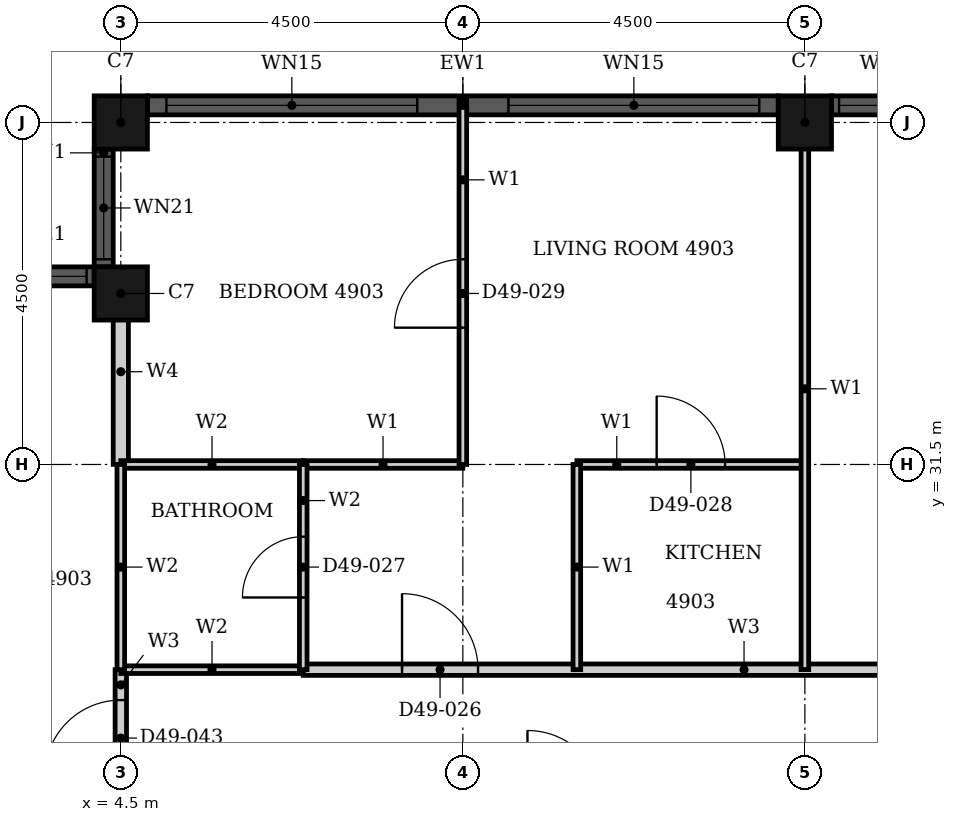
"""IFC4 building model, lengths in metres.
Left out: names, types, materials, properties, quantities, classifications, styles, units other than length and angle.
Written with IfcOpenShell. Run it as: python <this file> out.ifc"""

import sys

from ifc_helpers import new_model, si_unit, direction, frame, frame_2d, origin, origin_2d, place, context, subcontext, project, spatial, rectangle, hollow_rectangle, extrude, element, fill, save


model = new_model("IFC4")
c1 = context("Model", 3, precision=1e-05, world=origin(), true_north=direction((0.0, 1.0)))
c2 = subcontext(c1, "Body", "Model", "MODEL_VIEW")
j1 = project(units=[si_unit("LENGTHUNIT", "METRE"), si_unit("PLANEANGLEUNIT", "RADIAN")], contexts=[c1])
p1 = place(None, origin())
s1 = spatial("IfcSite", under=j1, at=p1, CompositionType="ELEMENT")
p2 = place(p1, origin())
s2 = spatial("IfcBuilding", under=s1, at=p2, CompositionType="ELEMENT")
p3 = place(p2, frame((0.0, 0.0, 196.1)))
s3 = spatial("IfcBuildingStorey", under=s2, at=p3, CompositionType="ELEMENT", Elevation=196.1)
for number, where, z_axis, x_axis in (
    (1, (13.5, 36.0, 0.0), (0.0, 0.0, 1.0), (1.0, 0.0, 0.0)),
    (2, (4.5, 36.0, 0.0), (0.0, 0.0, 1.0), (1.0, 0.0, 0.0)),
    (3, (4.5, 33.75, 0.0), (0.0, 0.0, 1.0), (1.0, 0.0, 0.0)),
):
    element("IfcColumn", number, at=place(p3, frame(where, z_axis=z_axis, x_axis=x_axis)), inside=s3, PredefinedType="COLUMN", context=c2, shape_type="SweptSolid", body=[
        extrude(hollow_rectangle(XDim=0.7, YDim=0.7, WallThickness=0.022, at=origin_2d()), origin(), (0.0, 0.0, 1.0), 3.7),
    ])
p4 = place(p3, frame((15.4, 36.225, 0.0), z_axis=(0.0, 0.0, 1.0), x_axis=(-1.0, 0.0, 0.0)))
e4 = element("IfcWall", 4, at=p4, inside=s3, PredefinedType="SOLIDWALL", context=c2, shape_type="SweptSolid", body=[
    extrude(rectangle(XDim=1.55, YDim=0.25, at=frame_2d((0.775, 0.0))), origin(), (0.0, 0.0, 1.0), 3.7),
])
p5 = place(p4, frame((0.1, 0.0, 0.9)))
e5 = element("IfcOpeningElement", 5, at=p5, cuts=e4, PredefinedType="OPENING", context=c2, shape_type="SweptSolid", body=[
    extrude(rectangle(XDim=1.35, YDim=1.85, at=frame_2d((0.675, 0.925))), frame((0.0, 0.135, 0.0), z_axis=(0.0, -1.0, 0.0), x_axis=(1.0, 0.0, 0.0)), (0.0, 0.0, 1.0), 0.27),
])
p6 = place(p3, frame((13.15, 36.225, 0.0), z_axis=(0.0, 0.0, 1.0), x_axis=(-1.0, 0.0, 0.0)))
e6 = element("IfcWall", 6, at=p6, inside=s3, PredefinedType="SOLIDWALL", context=c2, shape_type="SweptSolid", body=[
    extrude(rectangle(XDim=8.3, YDim=0.25, at=frame_2d((4.15, 0.0))), origin(), (0.0, 0.0, 1.0), 3.7),
])
p7 = place(p6, frame((0.25, 0.0, 0.45)))
e7 = element("IfcOpeningElement", 7, at=p7, cuts=e6, PredefinedType="OPENING", context=c2, shape_type="SweptSolid", body=[
    extrude(rectangle(XDim=3.3, YDim=2.3, at=frame_2d((1.65, 1.15))), frame((0.0, 0.135, 0.0), z_axis=(0.0, -1.0, 0.0), x_axis=(1.0, 0.0, 0.0)), (0.0, 0.0, 1.0), 0.27),
])
p8 = place(p6, frame((4.75, 0.0, 0.45)))
e8 = element("IfcOpeningElement", 8, at=p8, cuts=e6, PredefinedType="OPENING", context=c2, shape_type="SweptSolid", body=[
    extrude(rectangle(XDim=3.3, YDim=2.3, at=frame_2d((1.65, 1.15))), frame((0.0, 0.135, 0.0), z_axis=(0.0, -1.0, 0.0), x_axis=(1.0, 0.0, 0.0)), (0.0, 0.0, 1.0), 0.27),
])
p9 = place(p3, frame((4.275, 35.65, 0.0), z_axis=(0.0, 0.0, 1.0), x_axis=(0.0, -1.0, 0.0)))
e9 = element("IfcWall", 9, at=p9, inside=s3, PredefinedType="SOLIDWALL", context=c2, shape_type="SweptSolid", body=[
    extrude(rectangle(XDim=1.55, YDim=0.25, at=frame_2d((0.775, 0.0))), origin(), (0.0, 0.0, 1.0), 3.7),
])
p10 = place(p9, frame((0.1, 0.0, 0.9)))
e10 = element("IfcOpeningElement", 10, at=p10, cuts=e9, PredefinedType="OPENING", context=c2, shape_type="SweptSolid", body=[
    extrude(rectangle(XDim=1.35, YDim=1.85, at=frame_2d((0.675, 0.925))), frame((0.0, 0.135, 0.0), z_axis=(0.0, -1.0, 0.0), x_axis=(1.0, 0.0, 0.0)), (0.0, 0.0, 1.0), 0.27),
])
p11 = place(p3, frame((4.15, 33.975, 0.0), z_axis=(0.0, 0.0, 1.0), x_axis=(-1.0, 0.0, 0.0)))
e11 = element("IfcWall", 11, at=p11, inside=s3, PredefinedType="SOLIDWALL", context=c2, shape_type="SweptSolid", body=[
    extrude(rectangle(XDim=1.55, YDim=0.25, at=frame_2d((0.775, 0.0))), origin(), (0.0, 0.0, 1.0), 3.7),
])
p12 = place(p11, frame((0.1, 0.0, 0.9)))
e12 = element("IfcOpeningElement", 12, at=p12, cuts=e11, PredefinedType="OPENING", context=c2, shape_type="SweptSolid", body=[
    extrude(rectangle(XDim=1.35, YDim=1.85, at=frame_2d((0.675, 0.925))), frame((0.0, 0.135, 0.0), z_axis=(0.0, -1.0, 0.0), x_axis=(1.0, 0.0, 0.0)), (0.0, 0.0, 1.0), 0.27),
])
p13 = place(p3, frame((6.9, 28.8, 0.0), z_axis=(0.0, 0.0, 1.0), x_axis=(1.0, 0.0, 0.0)))
e13 = element("IfcWall", 13, at=p13, inside=s3, PredefinedType="PARTITIONING", context=c2, shape_type="SweptSolid", body=[
    extrude(rectangle(XDim=9.299, YDim=0.15, at=frame_2d((4.649, 0.0))), origin(), (0.0, 0.0, 1.0), 3.4),
])
p14 = place(p13, frame((1.3, 0.0, 0.0)))
e14 = element("IfcOpeningElement", 14, at=p14, cuts=e13, PredefinedType="OPENING", context=c2, shape_type="SweptSolid", body=[
    extrude(rectangle(XDim=1.0, YDim=2.2, at=frame_2d((0.5, 1.1))), frame((0.0, 0.085, 0.0), z_axis=(0.0, -1.0, 0.0), x_axis=(1.0, 0.0, 0.0)), (0.0, 0.0, 1.0), 0.17),
])
p15 = place(p3, frame((4.5, 27.0, 0.0), z_axis=(0.0, 0.0, 1.0), x_axis=(0.0, 1.0, 0.0)))
e15 = element("IfcWall", 15, at=p15, inside=s3, PredefinedType="PARTITIONING", context=c2, shape_type="SweptSolid", body=[
    extrude(rectangle(XDim=1.8, YDim=0.15, at=frame_2d((0.9, 0.0))), origin(), (0.0, 0.0, 1.0), 3.4),
])
p16 = place(p15, frame((0.4, 0.0, 0.0)))
e16 = element("IfcOpeningElement", 16, at=p16, cuts=e15, PredefinedType="OPENING", context=c2, shape_type="SweptSolid", body=[
    extrude(rectangle(XDim=1.0, YDim=2.2, at=frame_2d((0.5, 1.1))), frame((0.0, 0.085, 0.0), z_axis=(0.0, -1.0, 0.0), x_axis=(1.0, 0.0, 0.0)), (0.0, 0.0, 1.0), 0.17),
])
p17 = place(p3, frame((6.9, 31.5, 0.0), z_axis=(0.0, 0.0, 1.0), x_axis=(1.0, 0.0, 0.0)))
e17 = element("IfcWall", 17, at=p17, inside=s3, PredefinedType="PARTITIONING", context=c2, shape_type="SweptSolid", body=[
    extrude(rectangle(XDim=2.1, YDim=0.1, at=frame_2d((1.05, 0.0))), origin(), (0.0, 0.0, 1.0), 2.68),
])
p18 = place(p3, frame((10.5, 31.5, 0.0), z_axis=(0.0, 0.0, 1.0), x_axis=(1.0, 0.0, 0.0)))
e18 = element("IfcWall", 18, at=p18, inside=s3, PredefinedType="PARTITIONING", context=c2, shape_type="SweptSolid", body=[
    extrude(rectangle(XDim=3.0, YDim=0.1, at=frame_2d((1.5, 0.0))), origin(), (0.0, 0.0, 1.0), 2.68),
])
p19 = place(p18, frame((1.05, 0.0, 0.0)))
e19 = element("IfcOpeningElement", 19, at=p19, cuts=e18, PredefinedType="OPENING", context=c2, shape_type="SweptSolid", body=[
    extrude(rectangle(XDim=0.9, YDim=2.1, at=frame_2d((0.45, 1.05))), frame((0.0, 0.06, 0.0), z_axis=(0.0, -1.0, 0.0), x_axis=(1.0, 0.0, 0.0)), (0.0, 0.0, 1.0), 0.12),
])
p20 = place(p3, frame((10.5, 28.8, 0.0), z_axis=(0.0, 0.0, 1.0), x_axis=(0.0, 1.0, 0.0)))
e20 = element("IfcWall", 20, at=p20, inside=s3, PredefinedType="PARTITIONING", context=c2, shape_type="SweptSolid", body=[
    extrude(rectangle(XDim=2.7, YDim=0.1, at=frame_2d((1.35, 0.0))), origin(), (0.0, 0.0, 1.0), 3.4),
])
p21 = place(p3, frame((13.5, 28.801, 0.0), z_axis=(0.0, 0.0, 1.0), x_axis=(0.0, 1.0, 0.0)))
e21 = element("IfcWall", 21, at=p21, inside=s3, PredefinedType="PARTITIONING", context=c2, shape_type="SweptSolid", body=[
    extrude(rectangle(XDim=7.389, YDim=0.1, at=frame_2d((3.694, 0.0))), origin(), (0.0, 0.0, 1.0), 2.48),
])
p22 = place(p3, frame((9.0, 31.5, 0.0), z_axis=(0.0, 0.0, 1.0), x_axis=(0.0, 1.0, 0.0)))
e22 = element("IfcWall", 22, at=p22, inside=s3, PredefinedType="PARTITIONING", context=c2, shape_type="SweptSolid", body=[
    extrude(rectangle(XDim=4.79, YDim=0.1, at=frame_2d((2.395, 0.0))), origin(), (0.0, 0.0, 1.0), 3.4),
])
p23 = place(p22, frame((1.8, 0.0, 0.0)))
e23 = element("IfcOpeningElement", 23, at=p23, cuts=e22, PredefinedType="OPENING", context=c2, shape_type="SweptSolid", body=[
    extrude(rectangle(XDim=0.9, YDim=2.1, at=frame_2d((0.45, 1.05))), frame((0.0, 0.06, 0.0), z_axis=(0.0, -1.0, 0.0), x_axis=(1.0, 0.0, 0.0)), (0.0, 0.0, 1.0), 0.12),
])
p24 = place(p3, frame((4.5, 31.501, 0.0), z_axis=(0.0, 0.0, 1.0), x_axis=(0.0, 1.0, 0.0)))
e24 = element("IfcWall", 24, at=p24, inside=s3, PredefinedType="PARTITIONING", context=c2, shape_type="SweptSolid", body=[
    extrude(rectangle(XDim=2.439, YDim=0.2, at=frame_2d((1.219, 0.0))), origin(), (0.0, 0.0, 1.0), 3.4),
])
p25 = place(p3, frame((4.5, 28.8, 0.0), z_axis=(0.0, 0.0, 1.0), x_axis=(1.0, 0.0, 0.0)))
e25 = element("IfcWall", 25, at=p25, inside=s3, PredefinedType="PARTITIONING", context=c2, shape_type="SweptSolid", body=[
    extrude(rectangle(XDim=2.4, YDim=0.1, at=frame_2d((1.2, 0.0))), origin(), (0.0, 0.0, 1.0), 3.4),
])
p26 = place(p3, frame((4.5, 31.5, 0.0), z_axis=(0.0, 0.0, 1.0), x_axis=(1.0, 0.0, 0.0)))
e26 = element("IfcWall", 26, at=p26, inside=s3, PredefinedType="PARTITIONING", context=c2, shape_type="SweptSolid", body=[
    extrude(rectangle(XDim=2.4, YDim=0.1, at=frame_2d((1.2, 0.0))), origin(), (0.0, 0.0, 1.0), 2.68),
])
p27 = place(p3, frame((4.5, 28.8, 0.0), z_axis=(0.0, 0.0, 1.0), x_axis=(0.0, 1.0, 0.0)))
e27 = element("IfcWall", 27, at=p27, inside=s3, PredefinedType="PARTITIONING", context=c2, shape_type="SweptSolid", body=[
    extrude(rectangle(XDim=2.7, YDim=0.1, at=frame_2d((1.35, 0.0))), origin(), (0.0, 0.0, 1.0), 3.4),
])
p28 = place(p3, frame((6.9, 28.8, 0.0), z_axis=(0.0, 0.0, 1.0), x_axis=(0.0, 1.0, 0.0)))
e28 = element("IfcWall", 28, at=p28, inside=s3, PredefinedType="PARTITIONING", context=c2, shape_type="SweptSolid", body=[
    extrude(rectangle(XDim=2.7, YDim=0.1, at=frame_2d((1.35, 0.0))), origin(), (0.0, 0.0, 1.0), 3.4),
])
p29 = place(p28, frame((0.95, 0.0, 0.0)))
e29 = element("IfcOpeningElement", 29, at=p29, cuts=e28, PredefinedType="OPENING", context=c2, shape_type="SweptSolid", body=[
    extrude(rectangle(XDim=0.8, YDim=2.1, at=frame_2d((0.4, 1.05))), frame((0.0, 0.06, 0.0), z_axis=(0.0, -1.0, 0.0), x_axis=(1.0, 0.0, 0.0)), (0.0, 0.0, 1.0), 0.12),
])
p30 = place(p5, origin())
e30 = element("IfcWindow", 30, at=p30, inside=s3, PartitioningType="SINGLE_PANEL", PredefinedType="WINDOW", context=c2, shape_type="SweptSolid", body=[
    extrude(rectangle(XDim=1.35, YDim=1.85, at=frame_2d((0.675, 0.925))), frame((0.0, 0.03, 0.0), z_axis=(0.0, -1.0, 0.0), x_axis=(1.0, 0.0, 0.0)), (0.0, 0.0, 1.0), 0.06),
])
fill(e5, e30)
p31 = place(p7, origin())
e31 = element("IfcWindow", 31, at=p31, inside=s3, PartitioningType="SINGLE_PANEL", PredefinedType="WINDOW", context=c2, shape_type="SweptSolid", body=[
    extrude(rectangle(XDim=3.3, YDim=2.3, at=frame_2d((1.65, 1.15))), frame((0.0, 0.03, 0.0), z_axis=(0.0, -1.0, 0.0), x_axis=(1.0, 0.0, 0.0)), (0.0, 0.0, 1.0), 0.06),
])
fill(e7, e31)
p32 = place(p8, origin())
e32 = element("IfcWindow", 32, at=p32, inside=s3, PartitioningType="SINGLE_PANEL", PredefinedType="WINDOW", context=c2, shape_type="SweptSolid", body=[
    extrude(rectangle(XDim=3.3, YDim=2.3, at=frame_2d((1.65, 1.15))), frame((0.0, 0.03, 0.0), z_axis=(0.0, -1.0, 0.0), x_axis=(1.0, 0.0, 0.0)), (0.0, 0.0, 1.0), 0.06),
])
fill(e8, e32)
p33 = place(p10, origin())
e33 = element("IfcWindow", 33, at=p33, inside=s3, PartitioningType="SINGLE_PANEL", PredefinedType="WINDOW", context=c2, shape_type="SweptSolid", body=[
    extrude(rectangle(XDim=1.35, YDim=1.85, at=frame_2d((0.675, 0.925))), frame((0.0, 0.03, 0.0), z_axis=(0.0, -1.0, 0.0), x_axis=(1.0, 0.0, 0.0)), (0.0, 0.0, 1.0), 0.06),
])
fill(e10, e33)
p34 = place(p12, origin())
e34 = element("IfcWindow", 34, at=p34, inside=s3, PartitioningType="SINGLE_PANEL", PredefinedType="WINDOW", context=c2, shape_type="SweptSolid", body=[
    extrude(rectangle(XDim=1.35, YDim=1.85, at=frame_2d((0.675, 0.925))), frame((0.0, 0.03, 0.0), z_axis=(0.0, -1.0, 0.0), x_axis=(1.0, 0.0, 0.0)), (0.0, 0.0, 1.0), 0.06),
])
fill(e12, e34)
p35 = place(p14, origin())
e35 = element("IfcDoor", 35, at=p35, inside=s3, OperationType="SINGLE_SWING_RIGHT", PredefinedType="DOOR", context=c2, shape_type="SweptSolid", body=[
    extrude(rectangle(XDim=1.0, YDim=2.2, at=frame_2d((0.5, 1.1))), frame((0.0, 0.025, 0.0), z_axis=(0.0, -1.0, 0.0), x_axis=(1.0, 0.0, 0.0)), (0.0, 0.0, 1.0), 0.05),
])
fill(e14, e35)
p36 = place(p29, origin())
e36 = element("IfcDoor", 36, at=p36, inside=s3, OperationType="SINGLE_SWING_LEFT", PredefinedType="DOOR", context=c2, shape_type="SweptSolid", body=[
    extrude(rectangle(XDim=0.8, YDim=2.1, at=frame_2d((0.4, 1.05))), frame((0.0, 0.025, 0.0), z_axis=(0.0, -1.0, 0.0), x_axis=(1.0, 0.0, 0.0)), (0.0, 0.0, 1.0), 0.05),
])
fill(e29, e36)
p37 = place(p19, origin())
e37 = element("IfcDoor", 37, at=p37, inside=s3, OperationType="SINGLE_SWING_RIGHT", PredefinedType="DOOR", context=c2, shape_type="SweptSolid", body=[
    extrude(rectangle(XDim=0.9, YDim=2.1, at=frame_2d((0.45, 1.05))), frame((0.0, 0.025, 0.0), z_axis=(0.0, -1.0, 0.0), x_axis=(1.0, 0.0, 0.0)), (0.0, 0.0, 1.0), 0.05),
])
fill(e19, e37)
p38 = place(p23, origin())
e38 = element("IfcDoor", 38, at=p38, inside=s3, OperationType="SINGLE_SWING_RIGHT", PredefinedType="DOOR", context=c2, shape_type="SweptSolid", body=[
    extrude(rectangle(XDim=0.9, YDim=2.1, at=frame_2d((0.45, 1.05))), frame((0.0, 0.025, 0.0), z_axis=(0.0, -1.0, 0.0), x_axis=(1.0, 0.0, 0.0)), (0.0, 0.0, 1.0), 0.05),
])
fill(e23, e38)
p39 = place(p16, origin())
e39 = element("IfcDoor", 39, at=p39, inside=s3, OperationType="SINGLE_SWING_RIGHT", PredefinedType="DOOR", context=c2, shape_type="SweptSolid", body=[
    extrude(rectangle(XDim=1.0, YDim=2.2, at=frame_2d((0.5, 1.1))), frame((0.0, 0.025, 0.0), z_axis=(0.0, -1.0, 0.0), x_axis=(1.0, 0.0, 0.0)), (0.0, 0.0, 1.0), 0.05),
])
fill(e16, e39)
save(model, sys.argv[1])
